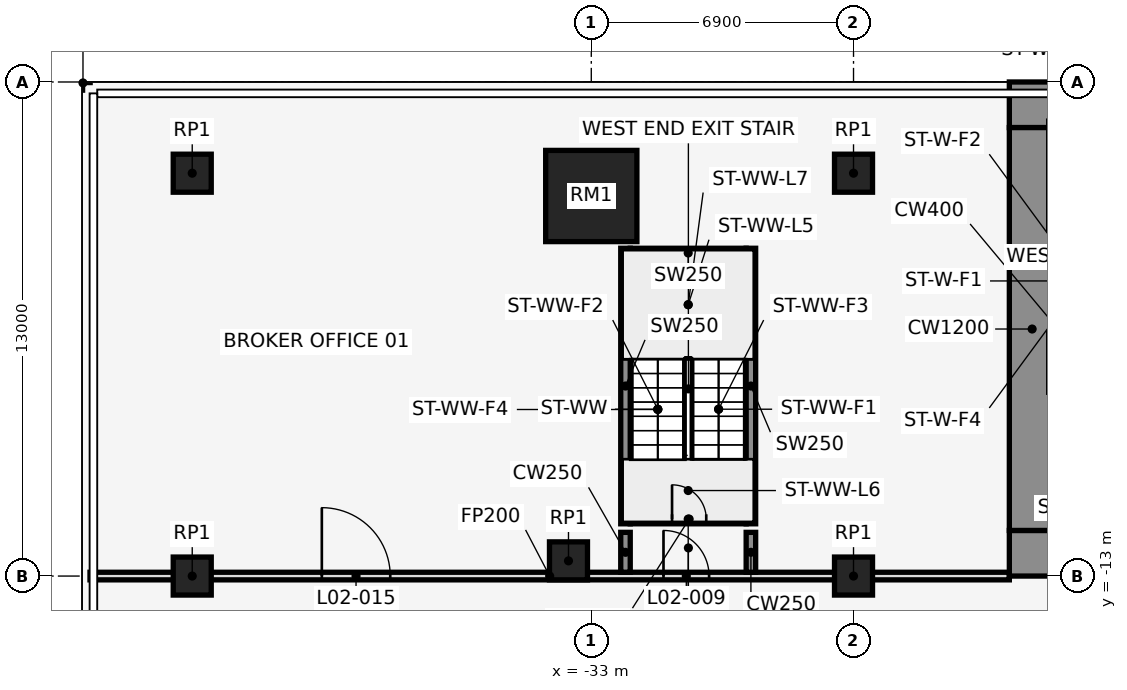
"""IFC4 building model, lengths in metres.
Left out: names, types, materials, properties, quantities, classifications, styles, units other than length and angle.
Written with IfcOpenShell. Run it as: python <this file> out.ifc"""

import sys

from ifc_helpers import new_model, si_unit, direction, frame, frame_2d, origin, origin_2d, place, context, subcontext, project, spatial, rectangle, extrude, element, fill, save


model = new_model("IFC4")
c1 = context("Model", 3, precision=1e-05, world=origin(), true_north=direction((0.0, 1.0)))
c2 = subcontext(c1, "Body", "Model", "MODEL_VIEW")
j1 = project(units=[si_unit("LENGTHUNIT", "METRE"), si_unit("PLANEANGLEUNIT", "RADIAN")], contexts=[c1])
p1 = place(None, origin())
s1 = spatial("IfcSite", under=j1, at=p1, CompositionType="ELEMENT")
p2 = place(p1, origin())
s2 = spatial("IfcBuilding", under=s1, at=p2, CompositionType="ELEMENT")
p3 = place(p2, frame((0.0, 0.0, 14.0)))
s3 = spatial("IfcBuildingStorey", under=s2, at=p3, CompositionType="ELEMENT", Elevation=14.0)
p4 = place(p3, frame((-33.0, -3.0, 0.0), z_axis=(0.0, 0.0, 1.0), x_axis=(1.0, 0.0, 0.0)))
e1 = element("IfcColumn", 1, at=p4, inside=s3, PredefinedType="COLUMN", context=c2, shape_type="SweptSolid", body=[
    extrude(rectangle(XDim=2.4, YDim=2.4, at=origin_2d()), origin(), (0.0, 0.0, 1.0), 6.0),
])
for number, where, z_axis, x_axis in (
    (2, (-26.1, -2.4, 0.0), (0.0, 0.0, 1.0), (1.0, 0.0, 0.0)),
    (3, (-33.6, -12.6, 0.0), (0.0, 0.0, 1.0), (1.0, 0.0, 0.0)),
    (4, (-43.5, -2.4, 0.0), (0.0, 0.0, 1.0), (1.0, 0.0, 0.0)),
    (5, (-43.5, -13.0, 0.0), (0.0, 0.0, 1.0), (1.0, 0.0, 0.0)),
    (6, (-26.1, -13.0, 0.0), (0.0, 0.0, 1.0), (1.0, 0.0, 0.0)),
):
    element("IfcColumn", number, at=place(p3, frame(where, z_axis=z_axis, x_axis=x_axis)), inside=s3, PredefinedType="COLUMN", context=c2, shape_type="SweptSolid", body=[
        extrude(rectangle(XDim=1.0, YDim=1.0, at=origin_2d()), origin(), (0.0, 0.0, 1.0), 6.0),
    ])
for number, where, z_axis, x_axis in (
    (7, (-32.1, -11.625, 0.0), (0.0, 0.0, 1.0), (0.0, 1.0, 0.0)),
    (8, (-28.8, -11.625, 0.0), (0.0, 0.0, 1.0), (0.0, 1.0, 0.0)),
):
    element("IfcWall", number, at=place(p3, frame(where, z_axis=z_axis, x_axis=x_axis)), inside=s3, PredefinedType="SHEAR", context=c2, shape_type="SweptSolid", body=[
        extrude(rectangle(XDim=7.25, YDim=0.25, at=frame_2d((3.625, 0.0))), origin(), (0.0, 0.0, 1.0), 6.0),
    ])
p5 = place(p3, frame((-31.975, -11.5, 0.0), z_axis=(0.0, 0.0, 1.0), x_axis=(1.0, 0.0, 0.0)))
e9 = element("IfcWall", 9, at=p5, inside=s3, PredefinedType="SHEAR", context=c2, shape_type="SweptSolid", body=[
    extrude(rectangle(XDim=3.05, YDim=0.25, at=frame_2d((1.525, 0.0))), origin(), (0.0, 0.0, 1.0), 6.0),
])
p6 = place(p5, frame((1.1, 0.0, 0.0)))
e10 = element("IfcOpeningElement", 10, at=p6, cuts=e9, PredefinedType="OPENING", context=c2, shape_type="SweptSolid", body=[
    extrude(rectangle(XDim=0.9, YDim=2.1, at=frame_2d((0.45, 1.05))), frame((0.0, 0.137, 0.0), z_axis=(0.0, -1.0, 0.0), x_axis=(1.0, 0.0, 0.0)), (0.0, 0.0, 1.0), 0.274),
])
p7 = place(p3, frame((-31.975, -4.5, 0.0), z_axis=(0.0, 0.0, 1.0), x_axis=(1.0, 0.0, 0.0)))
e11 = element("IfcWall", 11, at=p7, inside=s3, PredefinedType="SHEAR", context=c2, shape_type="SweptSolid", body=[
    extrude(rectangle(XDim=3.05, YDim=0.25, at=frame_2d((1.525, 0.0))), origin(), (0.0, 0.0, 1.0), 6.0),
])
p8 = place(p3, frame((-46.19, -13.0, 0.0), z_axis=(0.0, 0.0, 1.0), x_axis=(1.0, 0.0, 0.0)))
e12 = element("IfcWall", 12, at=p8, inside=s3, PredefinedType="PARTITIONING", context=c2, shape_type="SweptSolid", body=[
    extrude(rectangle(XDim=24.19, YDim=0.2, at=frame_2d((12.095, 0.0))), origin(), (0.0, 0.0, 1.0), 5.7),
])
p9 = place(p8, frame((15.09, 0.0, 0.0)))
e13 = element("IfcOpeningElement", 13, at=p9, cuts=e12, PredefinedType="OPENING", context=c2, shape_type="SweptSolid", body=[
    extrude(rectangle(XDim=1.2, YDim=2.1, at=frame_2d((0.6, 1.05))), frame((0.0, 0.112, 0.0), z_axis=(0.0, -1.0, 0.0), x_axis=(1.0, 0.0, 0.0)), (0.0, 0.0, 1.0), 0.224),
])
p10 = place(p8, frame((6.1, 0.0, 0.0)))
e14 = element("IfcOpeningElement", 14, at=p10, cuts=e12, PredefinedType="OPENING", context=c2, shape_type="SweptSolid", body=[
    extrude(rectangle(XDim=1.8, YDim=2.1, at=frame_2d((0.9, 1.05))), frame((0.0, 0.112, 0.0), z_axis=(0.0, -1.0, 0.0), x_axis=(1.0, 0.0, 0.0)), (0.0, 0.0, 1.0), 0.224),
])
for number, where, z_axis, x_axis in (
    (15, (-32.1, -12.9, 0.0), (0.0, 0.0, 1.0), (0.0, 1.0, 0.0)),
    (16, (-28.8, -12.9, 0.0), (0.0, 0.0, 1.0), (0.0, 1.0, 0.0)),
):
    element("IfcWall", number, at=place(p3, frame(where, z_axis=z_axis, x_axis=x_axis)), inside=s3, PredefinedType="SHEAR", context=c2, shape_type="SweptSolid", body=[
        extrude(rectangle(XDim=1.05, YDim=0.25, at=frame_2d((0.525, 0.0))), origin(), (0.0, 0.0, 1.0), 6.0),
    ])
p11 = place(p3, frame((-22.0, -0.6, 0.0), z_axis=(0.0, 0.0, 1.0), x_axis=(1.0, 0.0, 0.0)))
e17 = element("IfcWall", 17, at=p11, inside=s3, PredefinedType="SHEAR", context=c2, shape_type="SweptSolid", body=[
    extrude(rectangle(XDim=44.0, YDim=1.2, at=frame_2d((22.0, 0.0))), origin(), (0.0, 0.0, 1.0), 6.0),
])
p12 = place(p3, frame((-22.0, -12.4, 0.0), z_axis=(0.0, 0.0, 1.0), x_axis=(1.0, 0.0, 0.0)))
e18 = element("IfcWall", 18, at=p12, inside=s3, PredefinedType="SHEAR", context=c2, shape_type="SweptSolid", body=[
    extrude(rectangle(XDim=44.0, YDim=1.2, at=frame_2d((22.0, 0.0))), origin(), (0.0, 0.0, 1.0), 6.0),
])
p13 = place(p12, frame((2.2, 0.0, 0.0)))
e19 = element("IfcOpeningElement", 19, at=p13, cuts=e18, PredefinedType="OPENING", context=c2, shape_type="SweptSolid", body=[
    extrude(rectangle(XDim=1.2, YDim=2.1, at=frame_2d((0.6, 1.05))), frame((0.0, 0.612, 0.0), z_axis=(0.0, -1.0, 0.0), x_axis=(1.0, 0.0, 0.0)), (0.0, 0.0, 1.0), 1.224),
])
p14 = place(p12, frame((21.4, 0.0, 0.0)))
e20 = element("IfcOpeningElement", 20, at=p14, cuts=e18, PredefinedType="OPENING", context=c2, shape_type="SweptSolid", body=[
    extrude(rectangle(XDim=1.2, YDim=2.1, at=frame_2d((0.6, 1.05))), frame((0.0, 0.612, 0.0), z_axis=(0.0, -1.0, 0.0), x_axis=(1.0, 0.0, 0.0)), (0.0, 0.0, 1.0), 1.224),
])
p15 = place(p12, frame((40.6, 0.0, 0.0)))
e21 = element("IfcOpeningElement", 21, at=p15, cuts=e18, PredefinedType="OPENING", context=c2, shape_type="SweptSolid", body=[
    extrude(rectangle(XDim=1.2, YDim=2.1, at=frame_2d((0.6, 1.05))), frame((0.0, 0.612, 0.0), z_axis=(0.0, -1.0, 0.0), x_axis=(1.0, 0.0, 0.0)), (0.0, 0.0, 1.0), 1.224),
])
p16 = place(p12, frame((16.0, 0.0, 0.0)))
e22 = element("IfcOpeningElement", 22, at=p16, cuts=e18, PredefinedType="OPENING", context=c2, shape_type="SweptSolid", body=[
    extrude(rectangle(XDim=1.8, YDim=2.1, at=frame_2d((0.9, 1.05))), frame((0.0, 0.612, 0.0), z_axis=(0.0, -1.0, 0.0), x_axis=(1.0, 0.0, 0.0)), (0.0, 0.0, 1.0), 1.224),
])
p17 = place(p12, frame((6.3, 0.0, 0.0)))
e23 = element("IfcOpeningElement", 23, at=p17, cuts=e18, PredefinedType="OPENING", context=c2, shape_type="SweptSolid", body=[
    extrude(rectangle(XDim=1.2, YDim=2.1, at=frame_2d((0.6, 1.05))), frame((0.0, 0.612, 0.0), z_axis=(0.0, -1.0, 0.0), x_axis=(1.0, 0.0, 0.0)), (0.0, 0.0, 1.0), 1.224),
])
p18 = place(p12, frame((26.2, 0.0, 0.0)))
e24 = element("IfcOpeningElement", 24, at=p18, cuts=e18, PredefinedType="OPENING", context=c2, shape_type="SweptSolid", body=[
    extrude(rectangle(XDim=1.8, YDim=2.1, at=frame_2d((0.9, 1.05))), frame((0.0, 0.612, 0.0), z_axis=(0.0, -1.0, 0.0), x_axis=(1.0, 0.0, 0.0)), (0.0, 0.0, 1.0), 1.224),
])
p19 = place(p12, frame((36.5, 0.0, 0.0)))
e25 = element("IfcOpeningElement", 25, at=p19, cuts=e18, PredefinedType="OPENING", context=c2, shape_type="SweptSolid", body=[
    extrude(rectangle(XDim=1.2, YDim=2.1, at=frame_2d((0.6, 1.05))), frame((0.0, 0.612, 0.0), z_axis=(0.0, -1.0, 0.0), x_axis=(1.0, 0.0, 0.0)), (0.0, 0.0, 1.0), 1.224),
])
p20 = place(p3, frame((-21.4, -11.8, 0.0), z_axis=(0.0, 0.0, 1.0), x_axis=(0.0, 1.0, 0.0)))
e26 = element("IfcWall", 26, at=p20, inside=s3, PredefinedType="SHEAR", context=c2, shape_type="SweptSolid", body=[
    extrude(rectangle(XDim=10.6, YDim=1.2, at=frame_2d((5.3, 0.0))), origin(), (0.0, 0.0, 1.0), 6.0),
])
p21 = place(p9, origin())
e27 = element("IfcDoor", 27, at=p21, inside=s3, OperationType="SINGLE_SWING_RIGHT", PredefinedType="DOOR", context=c2, shape_type="SweptSolid", body=[
    extrude(rectangle(XDim=1.2, YDim=2.1, at=frame_2d((0.6, 1.05))), frame((0.0, 0.025, 0.0), z_axis=(0.0, -1.0, 0.0), x_axis=(1.0, 0.0, 0.0)), (0.0, 0.0, 1.0), 0.05),
])
fill(e13, e27)
p22 = place(p6, origin())
e28 = element("IfcDoor", 28, at=p22, inside=s3, OperationType="SINGLE_SWING_LEFT", PredefinedType="DOOR", context=c2, shape_type="SweptSolid", body=[
    extrude(rectangle(XDim=0.9, YDim=2.1, at=frame_2d((0.45, 1.05))), frame((0.0, 0.025, 0.0), z_axis=(0.0, -1.0, 0.0), x_axis=(1.0, 0.0, 0.0)), (0.0, 0.0, 1.0), 0.05),
])
fill(e10, e28)
p23 = place(p10, origin())
e29 = element("IfcDoor", 29, at=p23, inside=s3, OperationType="SINGLE_SWING_LEFT", PredefinedType="DOOR", context=c2, shape_type="SweptSolid", body=[
    extrude(rectangle(XDim=1.8, YDim=2.1, at=frame_2d((0.9, 1.05))), frame((0.0, 0.025, 0.0), z_axis=(0.0, -1.0, 0.0), x_axis=(1.0, 0.0, 0.0)), (0.0, 0.0, 1.0), 0.05),
])
fill(e14, e29)
save(model, sys.argv[1])
